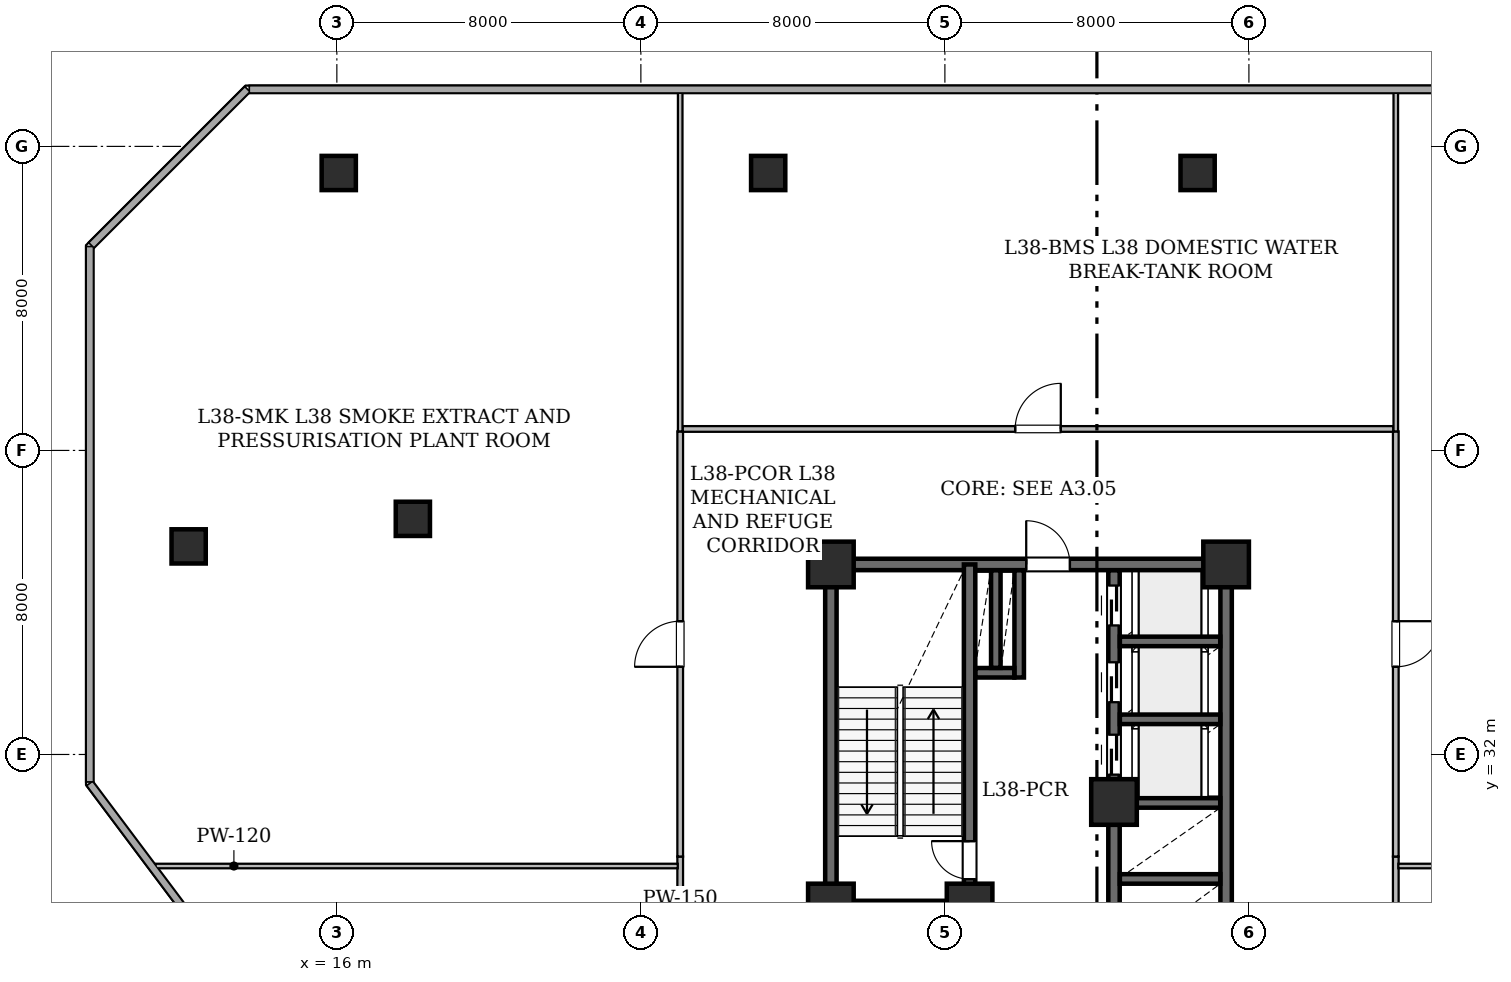
"""IFC4 building model, lengths in metres.
Left out: names, types, materials, properties, quantities, classifications, styles, units other than length and angle.
Written with IfcOpenShell. Run it as: python <this file> out.ifc"""

import sys

from ifc_helpers import new_model, si_unit, direction, frame, frame_2d, origin, origin_2d, place, context, subcontext, project, spatial, rectangle, hollow_rectangle, extrude, element, fill, save


model = new_model("IFC4")
c1 = context("Model", 3, precision=1e-05, world=origin(), true_north=direction((0.0, 1.0)))
c2 = subcontext(c1, "Body", "Model", "MODEL_VIEW")
j1 = project(units=[si_unit("LENGTHUNIT", "METRE"), si_unit("PLANEANGLEUNIT", "RADIAN")], contexts=[c1])
p1 = place(None, origin())
s1 = spatial("IfcSite", under=j1, at=p1, CompositionType="ELEMENT")
p2 = place(p1, origin())
s2 = spatial("IfcBuilding", under=s1, at=p2, CompositionType="ELEMENT")
p3 = place(p2, frame((0.0, 0.0, 150.5)))
s3 = spatial("IfcBuildingStorey", under=s2, at=p3, CompositionType="ELEMENT", Elevation=150.5)
for number, where, z_axis, x_axis in (
    (1, (32.65, 28.0, 0.0), (0.0, 0.0, 1.0), (1.0, 0.0, 0.0)),
    (2, (29.0, 28.0, 0.0), (0.0, 0.0, 1.0), (1.0, 0.0, 0.0)),
    (3, (29.0, 37.0, 0.0), (0.0, 0.0, 1.0), (1.0, 0.0, 0.0)),
    (4, (36.45, 30.75, 0.0), (0.0, 0.0, 1.0), (1.0, 0.0, 0.0)),
    (5, (39.4, 37.0, 0.0), (0.0, 0.0, 1.0), (1.0, 0.0, 0.0)),
):
    element("IfcColumn", number, at=place(p3, frame(where, z_axis=z_axis, x_axis=x_axis)), inside=s3, PredefinedType="COLUMN", context=c2, shape_type="SweptSolid", body=[
        extrude(hollow_rectangle(XDim=1.2, YDim=1.2, WallThickness=0.06, at=origin_2d()), origin(), (0.0, 0.0, 1.0), 5.375),
    ])
for number, where, z_axis, x_axis in (
    (6, (16.05, 47.3, 0.0), (0.0, 0.0, 1.0), (1.0, 0.0, 0.0)),
    (7, (27.35, 47.3, 0.0), (0.0, 0.0, 1.0), (1.0, 0.0, 0.0)),
    (8, (38.65, 47.3, 0.0), (0.0, 0.0, 1.0), (1.0, 0.0, 0.0)),
    (9, (12.1, 37.475, 0.0), (0.0, 0.0, 1.0), (1.0, 0.0, 0.0)),
    (10, (18.0, 38.2, 0.0), (0.0, 0.0, 1.0), (1.0, 0.0, 0.0)),
):
    element("IfcColumn", number, at=place(p3, frame(where, z_axis=z_axis, x_axis=x_axis)), inside=s3, PredefinedType="COLUMN", context=c2, shape_type="SweptSolid", body=[
        extrude(hollow_rectangle(XDim=0.9, YDim=0.9, WallThickness=0.045, at=origin_2d()), origin(), (0.0, 0.0, 1.0), 5.375),
    ])
p4 = place(p3, frame((11.873, 28.069, 0.0), z_axis=(0.0, 0.0, 1.0), x_axis=(-0.600029630681, 0.799977776132, 0.0)))
e11 = element("IfcWall", 11, at=p4, inside=s3, PredefinedType="STANDARD", context=c2, shape_type="SweptSolid", body=[
    extrude(rectangle(XDim=3.955, YDim=0.2, at=frame_2d((1.978, 0.0))), origin(), (0.0, 0.0, 1.0), 1.15),
])
p5 = place(p3, frame((9.5, 31.284, 0.0), z_axis=(0.0, 0.0, 1.0), x_axis=(0.0, 1.0, 0.0)))
e12 = element("IfcWall", 12, at=p5, inside=s3, PredefinedType="STANDARD", context=c2, shape_type="SweptSolid", body=[
    extrude(rectangle(XDim=14.075, YDim=0.2, at=frame_2d((7.038, 0.0))), origin(), (0.0, 0.0, 1.0), 1.15),
])
p6 = place(p3, frame((9.544, 45.403, 0.0), z_axis=(0.0, 0.0, 1.0), x_axis=(0.707127848917, 0.707085712828, 0.0)))
e13 = element("IfcWall", 13, at=p6, inside=s3, PredefinedType="STANDARD", context=c2, shape_type="SweptSolid", body=[
    extrude(rectangle(XDim=5.794, YDim=0.2, at=frame_2d((2.897, 0.0))), origin(), (0.0, 0.0, 1.0), 1.15),
])
p7 = place(p3, frame((13.702, 49.5, 0.0), z_axis=(0.0, 0.0, 1.0), x_axis=(1.0, 0.0, 0.0)))
e14 = element("IfcWall", 14, at=p7, inside=s3, PredefinedType="STANDARD", context=c2, shape_type="SweptSolid", body=[
    extrude(rectangle(XDim=38.657, YDim=0.2, at=frame_2d((19.329, 0.0))), origin(), (0.0, 0.0, 1.0), 1.15),
])
p8 = place(p3, frame((29.0, 28.0, 0.0), z_axis=(0.0, 0.0, 1.0), x_axis=(0.0, 1.0, 0.0)))
e15 = element("IfcWall", 15, at=p8, inside=s3, PredefinedType="SHEAR", context=c2, shape_type="SweptSolid", body=[
    extrude(rectangle(XDim=9.0, YDim=0.3, at=frame_2d((4.5, 0.0))), origin(), (0.0, 0.0, 1.0), 4.98),
])
p9 = place(p3, frame((29.0, 37.0, 0.0), z_axis=(0.0, 0.0, 1.0), x_axis=(1.0, 0.0, 0.0)))
e16 = element("IfcWall", 16, at=p9, inside=s3, PredefinedType="SHEAR", context=c2, shape_type="SweptSolid", body=[
    extrude(rectangle(XDim=10.4, YDim=0.3, at=frame_2d((5.2, 0.0))), origin(), (0.0, 0.0, 1.0), 4.98),
])
p10 = place(p9, frame((5.14, 0.0, 0.0)))
e17 = element("IfcOpeningElement", 17, at=p10, cuts=e16, PredefinedType="OPENING", context=c2, shape_type="SweptSolid", body=[
    extrude(rectangle(XDim=1.15, YDim=2.2, at=frame_2d((0.575, 1.1))), frame((0.0, 0.16, 0.0), z_axis=(0.0, -1.0, 0.0), x_axis=(1.0, 0.0, 0.0)), (0.0, 0.0, 1.0), 0.32),
])
p11 = place(p3, frame((39.4, 24.4, 0.0), z_axis=(0.0, 0.0, 1.0), x_axis=(0.0, 1.0, 0.0)))
e18 = element("IfcWall", 18, at=p11, inside=s3, PredefinedType="SHEAR", context=c2, shape_type="SweptSolid", body=[
    extrude(rectangle(XDim=12.6, YDim=0.3, at=frame_2d((6.3, 0.0))), origin(), (0.0, 0.0, 1.0), 4.98),
])
p12 = place(p3, frame((32.65, 28.0, 0.0), z_axis=(0.0, 0.0, 1.0), x_axis=(0.0, 1.0, 0.0)))
e19 = element("IfcWall", 19, at=p12, inside=s3, PredefinedType="SHEAR", context=c2, shape_type="SweptSolid", body=[
    extrude(rectangle(XDim=9.0, YDim=0.3, at=frame_2d((4.5, 0.0))), origin(), (0.0, 0.0, 1.0), 4.98),
])
p13 = place(p12, frame((0.72, 0.0, 0.0)))
e20 = element("IfcOpeningElement", 20, at=p13, cuts=e19, PredefinedType="OPENING", context=c2, shape_type="SweptSolid", body=[
    extrude(rectangle(XDim=1.0, YDim=2.15, at=frame_2d((0.5, 1.075))), frame((0.0, 0.16, 0.0), z_axis=(0.0, -1.0, 0.0), x_axis=(1.0, 0.0, 0.0)), (0.0, 0.0, 1.0), 0.32),
])
p14 = place(p3, frame((29.0, 28.0, 0.0), z_axis=(0.0, 0.0, 1.0), x_axis=(1.0, 0.0, 0.0)))
e21 = element("IfcWall", 21, at=p14, inside=s3, PredefinedType="SHEAR", context=c2, shape_type="SweptSolid", body=[
    extrude(rectangle(XDim=3.65, YDim=0.3, at=frame_2d((1.825, 0.0))), origin(), (0.0, 0.0, 1.0), 4.98),
])
p15 = place(p3, frame((36.45, 25.0, 0.0), z_axis=(0.0, 0.0, 1.0), x_axis=(0.0, 1.0, 0.0)))
e22 = element("IfcWall", 22, at=p15, inside=s3, PredefinedType="SHEAR", context=c2, shape_type="SweptSolid", body=[
    extrude(rectangle(XDim=5.15, YDim=0.3, at=frame_2d((2.575, 0.0))), origin(), (0.0, 0.0, 1.0), 4.98),
])
p16 = place(p3, frame((36.45, 31.35, 0.0), z_axis=(0.0, 0.0, 1.0), x_axis=(0.0, 1.0, 0.0)))
e23 = element("IfcWall", 23, at=p16, inside=s3, PredefinedType="SHEAR", context=c2, shape_type="SweptSolid", body=[
    extrude(rectangle(XDim=5.496, YDim=0.3, at=frame_2d((2.748, 0.0))), origin(), (0.0, 0.0, 1.0), 4.98),
])
p17 = place(p16, frame((0.12, 0.0, 0.0)))
e24 = element("IfcOpeningElement", 24, at=p17, cuts=e23, PredefinedType="OPENING", context=c2, shape_type="SweptSolid", body=[
    extrude(rectangle(XDim=1.05, YDim=2.15, at=frame_2d((0.525, 1.075))), frame((0.0, 0.16, 0.0), z_axis=(0.0, -1.0, 0.0), x_axis=(1.0, 0.0, 0.0)), (0.0, 0.0, 1.0), 0.32),
])
p18 = place(p16, frame((2.025, 0.0, 0.0)))
e25 = element("IfcOpeningElement", 25, at=p18, cuts=e23, PredefinedType="OPENING", context=c2, shape_type="SweptSolid", body=[
    extrude(rectangle(XDim=1.05, YDim=2.15, at=frame_2d((0.525, 1.075))), frame((0.0, 0.16, 0.0), z_axis=(0.0, -1.0, 0.0), x_axis=(1.0, 0.0, 0.0)), (0.0, 0.0, 1.0), 0.32),
])
p19 = place(p16, frame((4.045, 0.0, 0.0)))
e26 = element("IfcOpeningElement", 26, at=p19, cuts=e23, PredefinedType="OPENING", context=c2, shape_type="SweptSolid", body=[
    extrude(rectangle(XDim=1.05, YDim=2.15, at=frame_2d((0.525, 1.075))), frame((0.0, 0.16, 0.0), z_axis=(0.0, -1.0, 0.0), x_axis=(1.0, 0.0, 0.0)), (0.0, 0.0, 1.0), 0.32),
])
for number, where, z_axis, x_axis in (
    (27, (36.604, 28.725, 0.0), (0.0, 0.0, 1.0), (1.0, 0.0, 0.0)),
    (28, (36.604, 30.725, 0.0), (0.0, 0.0, 1.0), (1.0, 0.0, 0.0)),
    (29, (36.604, 32.925, 0.0), (0.0, 0.0, 1.0), (1.0, 0.0, 0.0)),
    (30, (36.604, 34.975, 0.0), (0.0, 0.0, 1.0), (1.0, 0.0, 0.0)),
):
    element("IfcWall", number, at=place(p3, frame(where, z_axis=z_axis, x_axis=x_axis)), inside=s3, PredefinedType="SHEAR", context=c2, shape_type="SweptSolid", body=[
        extrude(rectangle(XDim=2.642, YDim=0.25, at=frame_2d((1.321, 0.0))), origin(), (0.0, 0.0, 1.0), 4.98),
    ])
p20 = place(p3, frame((33.955, 34.025, 0.0), z_axis=(0.0, 0.0, 1.0), x_axis=(0.0, 1.0, 0.0)))
e31 = element("IfcWall", 31, at=p20, inside=s3, PredefinedType="SHEAR", context=c2, shape_type="SweptSolid", body=[
    extrude(rectangle(XDim=2.821, YDim=0.25, at=frame_2d((1.411, 0.0))), origin(), (0.0, 0.0, 1.0), 4.98),
])
p21 = place(p3, frame((32.804, 34.15, 0.0), z_axis=(0.0, 0.0, 1.0), x_axis=(1.0, 0.0, 0.0)))
e32 = element("IfcWall", 32, at=p21, inside=s3, PredefinedType="SHEAR", context=c2, shape_type="SweptSolid", body=[
    extrude(rectangle(XDim=1.022, YDim=0.25, at=frame_2d((0.511, 0.0))), origin(), (0.0, 0.0, 1.0), 4.98),
])
p22 = place(p3, frame((33.34, 34.279, 0.0), z_axis=(0.0, 0.0, 1.0), x_axis=(0.0, 1.0, 0.0)))
e33 = element("IfcWall", 33, at=p22, inside=s3, PredefinedType="SHEAR", context=c2, shape_type="SweptSolid", body=[
    extrude(rectangle(XDim=2.567, YDim=0.25, at=frame_2d((1.283, 0.0))), origin(), (0.0, 0.0, 1.0), 4.98),
])
p23 = place(p3, frame((25.035, 16.75, 0.0), z_axis=(0.0, 0.0, 1.0), x_axis=(0.0, 1.0, 0.0)))
e34 = element("IfcWall", 34, at=p23, inside=s3, PredefinedType="STANDARD", context=c2, shape_type="SweptSolid", body=[
    extrude(rectangle(XDim=12.564, YDim=0.15, at=frame_2d((6.282, 0.0))), origin(), (0.0, 0.0, 1.0), 3.42),
])
p24 = place(p23, frame((5.661, 0.0, 0.0)))
e35 = element("IfcOpeningElement", 35, at=p24, cuts=e34, PredefinedType="OPENING", context=c2, shape_type="SweptSolid", body=[
    extrude(rectangle(XDim=1.2, YDim=2.15, at=frame_2d((0.6, 1.075))), frame((0.0, 0.085, 0.0), z_axis=(0.0, -1.0, 0.0), x_axis=(1.0, 0.0, 0.0)), (0.0, 0.0, 1.0), 0.17),
])
p25 = place(p3, frame((25.035, 29.314, 0.0), z_axis=(0.0, 0.0, 1.0), x_axis=(0.0, 1.0, 0.0)))
e36 = element("IfcWall", 36, at=p25, inside=s3, PredefinedType="STANDARD", context=c2, shape_type="SweptSolid", body=[
    extrude(rectangle(XDim=11.186, YDim=0.15, at=frame_2d((5.593, 0.0))), origin(), (0.0, 0.0, 1.0), 3.42),
])
p26 = place(p25, frame((4.993, 0.0, 0.0)))
e37 = element("IfcOpeningElement", 37, at=p26, cuts=e36, PredefinedType="OPENING", context=c2, shape_type="SweptSolid", body=[
    extrude(rectangle(XDim=1.2, YDim=2.15, at=frame_2d((0.6, 1.075))), frame((0.0, 0.085, 0.0), z_axis=(0.0, -1.0, 0.0), x_axis=(1.0, 0.0, 0.0)), (0.0, 0.0, 1.0), 0.17),
])
p27 = place(p3, frame((43.865, 29.314, 0.0), z_axis=(0.0, 0.0, 1.0), x_axis=(0.0, -1.0, 0.0)))
e38 = element("IfcWall", 38, at=p27, inside=s3, PredefinedType="STANDARD", context=c2, shape_type="SweptSolid", body=[
    extrude(rectangle(XDim=12.564, YDim=0.15, at=frame_2d((6.282, 0.0))), origin(), (0.0, 0.0, 1.0), 3.42),
])
p28 = place(p27, frame((5.703, 0.0, 0.0)))
e39 = element("IfcOpeningElement", 39, at=p28, cuts=e38, PredefinedType="OPENING", context=c2, shape_type="SweptSolid", body=[
    extrude(rectangle(XDim=1.2, YDim=2.15, at=frame_2d((0.6, 1.075))), frame((0.0, 0.085, 0.0), z_axis=(0.0, -1.0, 0.0), x_axis=(1.0, 0.0, 0.0)), (0.0, 0.0, 1.0), 0.17),
])
p29 = place(p3, frame((43.865, 40.5, 0.0), z_axis=(0.0, 0.0, 1.0), x_axis=(0.0, -1.0, 0.0)))
e40 = element("IfcWall", 40, at=p29, inside=s3, PredefinedType="STANDARD", context=c2, shape_type="SweptSolid", body=[
    extrude(rectangle(XDim=11.186, YDim=0.15, at=frame_2d((5.593, 0.0))), origin(), (0.0, 0.0, 1.0), 3.42),
])
p30 = place(p29, frame((4.993, 0.0, 0.0)))
e41 = element("IfcOpeningElement", 41, at=p30, cuts=e40, PredefinedType="OPENING", context=c2, shape_type="SweptSolid", body=[
    extrude(rectangle(XDim=1.2, YDim=2.15, at=frame_2d((0.6, 1.075))), frame((0.0, 0.085, 0.0), z_axis=(0.0, -1.0, 0.0), x_axis=(1.0, 0.0, 0.0)), (0.0, 0.0, 1.0), 0.17),
])
p31 = place(p3, frame((25.1, 40.565, 0.0), z_axis=(0.0, 0.0, 1.0), x_axis=(1.0, 0.0, 0.0)))
e42 = element("IfcWall", 42, at=p31, inside=s3, PredefinedType="STANDARD", context=c2, shape_type="SweptSolid", body=[
    extrude(rectangle(XDim=18.7, YDim=0.15, at=frame_2d((9.35, 0.0))), origin(), (0.0, 0.0, 1.0), 3.42),
])
p32 = place(p31, frame((8.75, 0.0, 0.0)))
e43 = element("IfcOpeningElement", 43, at=p32, cuts=e42, PredefinedType="OPENING", context=c2, shape_type="SweptSolid", body=[
    extrude(rectangle(XDim=1.2, YDim=2.15, at=frame_2d((0.6, 1.075))), frame((0.0, 0.085, 0.0), z_axis=(0.0, -1.0, 0.0), x_axis=(1.0, 0.0, 0.0)), (0.0, 0.0, 1.0), 0.17),
])
p33 = place(p3, frame((11.23, 29.065, 0.0), z_axis=(0.0, 0.0, 1.0), x_axis=(1.0, 0.0, 0.0)))
e44 = element("IfcWall", 44, at=p33, inside=s3, PredefinedType="PARTITIONING", context=c2, shape_type="SweptSolid", body=[
    extrude(rectangle(XDim=13.74, YDim=0.12, at=frame_2d((6.87, 0.0))), origin(), (0.0, 0.0, 1.0), 3.42),
])
p34 = place(p3, frame((25.035, 49.408, 0.0), z_axis=(0.0, 0.0, 1.0), x_axis=(0.0, -1.0, 0.0)))
e45 = element("IfcWall", 45, at=p34, inside=s3, PredefinedType="PARTITIONING", context=c2, shape_type="SweptSolid", body=[
    extrude(rectangle(XDim=8.908, YDim=0.12, at=frame_2d((4.454, 0.0))), origin(), (0.0, 0.0, 1.0), 3.42),
])
p35 = place(p3, frame((43.932, 29.065, 0.0), z_axis=(0.0, 0.0, 1.0), x_axis=(1.0, 0.0, 0.0)))
e46 = element("IfcWall", 46, at=p35, inside=s3, PredefinedType="PARTITIONING", context=c2, shape_type="SweptSolid", body=[
    extrude(rectangle(XDim=10.838, YDim=0.12, at=frame_2d((5.419, 0.0))), origin(), (0.0, 0.0, 1.0), 3.42),
])
p36 = place(p3, frame((43.865, 40.5, 0.0), z_axis=(0.0, 0.0, 1.0), x_axis=(0.0, 1.0, 0.0)))
e47 = element("IfcWall", 47, at=p36, inside=s3, PredefinedType="PARTITIONING", context=c2, shape_type="SweptSolid", body=[
    extrude(rectangle(XDim=8.908, YDim=0.12, at=frame_2d((4.454, 0.0))), origin(), (0.0, 0.0, 1.0), 3.42),
])
p37 = place(p13, origin())
e48 = element("IfcDoor", 48, at=p37, inside=s3, OperationType="SINGLE_SWING_RIGHT", PredefinedType="DOOR", context=c2, shape_type="SweptSolid", body=[
    extrude(rectangle(XDim=1.0, YDim=2.15, at=frame_2d((0.5, 1.075))), frame((0.0, 0.025, 0.0), z_axis=(0.0, -1.0, 0.0), x_axis=(1.0, 0.0, 0.0)), (0.0, 0.0, 1.0), 0.05),
])
fill(e20, e48)
p38 = place(p10, origin())
e49 = element("IfcDoor", 49, at=p38, inside=s3, OperationType="SINGLE_SWING_LEFT", PredefinedType="DOOR", context=c2, shape_type="SweptSolid", body=[
    extrude(rectangle(XDim=1.15, YDim=2.2, at=frame_2d((0.575, 1.1))), frame((0.0, 0.025, 0.0), z_axis=(0.0, -1.0, 0.0), x_axis=(1.0, 0.0, 0.0)), (0.0, 0.0, 1.0), 0.05),
])
fill(e17, e49)
p39 = place(p17, origin())
e50 = element("IfcDoor", 50, at=p39, inside=s3, OperationType="SLIDING_TO_LEFT", PredefinedType="DOOR", context=c2, shape_type="SweptSolid", body=[
    extrude(rectangle(XDim=1.05, YDim=2.15, at=frame_2d((0.525, 1.075))), frame((0.0, 0.025, 0.0), z_axis=(0.0, -1.0, 0.0), x_axis=(1.0, 0.0, 0.0)), (0.0, 0.0, 1.0), 0.05),
])
fill(e24, e50)
p40 = place(p18, origin())
e51 = element("IfcDoor", 51, at=p40, inside=s3, OperationType="SLIDING_TO_LEFT", PredefinedType="DOOR", context=c2, shape_type="SweptSolid", body=[
    extrude(rectangle(XDim=1.05, YDim=2.15, at=frame_2d((0.525, 1.075))), frame((0.0, 0.025, 0.0), z_axis=(0.0, -1.0, 0.0), x_axis=(1.0, 0.0, 0.0)), (0.0, 0.0, 1.0), 0.05),
])
fill(e25, e51)
p41 = place(p19, origin())
e52 = element("IfcDoor", 52, at=p41, inside=s3, OperationType="SLIDING_TO_LEFT", PredefinedType="DOOR", context=c2, shape_type="SweptSolid", body=[
    extrude(rectangle(XDim=1.05, YDim=2.15, at=frame_2d((0.525, 1.075))), frame((0.0, 0.025, 0.0), z_axis=(0.0, -1.0, 0.0), x_axis=(1.0, 0.0, 0.0)), (0.0, 0.0, 1.0), 0.05),
])
fill(e26, e52)
p42 = place(p26, origin())
e53 = element("IfcDoor", 53, at=p42, inside=s3, OperationType="SINGLE_SWING_LEFT", PredefinedType="DOOR", context=c2, shape_type="SweptSolid", body=[
    extrude(rectangle(XDim=1.2, YDim=2.15, at=frame_2d((0.6, 1.075))), frame((0.0, 0.025, 0.0), z_axis=(0.0, -1.0, 0.0), x_axis=(1.0, 0.0, 0.0)), (0.0, 0.0, 1.0), 0.05),
])
fill(e37, e53)
p43 = place(p30, origin())
e54 = element("IfcDoor", 54, at=p43, inside=s3, OperationType="SINGLE_SWING_LEFT", PredefinedType="DOOR", context=c2, shape_type="SweptSolid", body=[
    extrude(rectangle(XDim=1.2, YDim=2.15, at=frame_2d((0.6, 1.075))), frame((0.0, 0.025, 0.0), z_axis=(0.0, -1.0, 0.0), x_axis=(1.0, 0.0, 0.0)), (0.0, 0.0, 1.0), 0.05),
])
fill(e41, e54)
p44 = place(p32, origin())
e55 = element("IfcDoor", 55, at=p44, inside=s3, OperationType="SINGLE_SWING_RIGHT", PredefinedType="DOOR", context=c2, shape_type="SweptSolid", body=[
    extrude(rectangle(XDim=1.2, YDim=2.15, at=frame_2d((0.6, 1.075))), frame((0.0, 0.025, 0.0), z_axis=(0.0, -1.0, 0.0), x_axis=(1.0, 0.0, 0.0)), (0.0, 0.0, 1.0), 0.05),
])
fill(e43, e55)
save(model, sys.argv[1])
